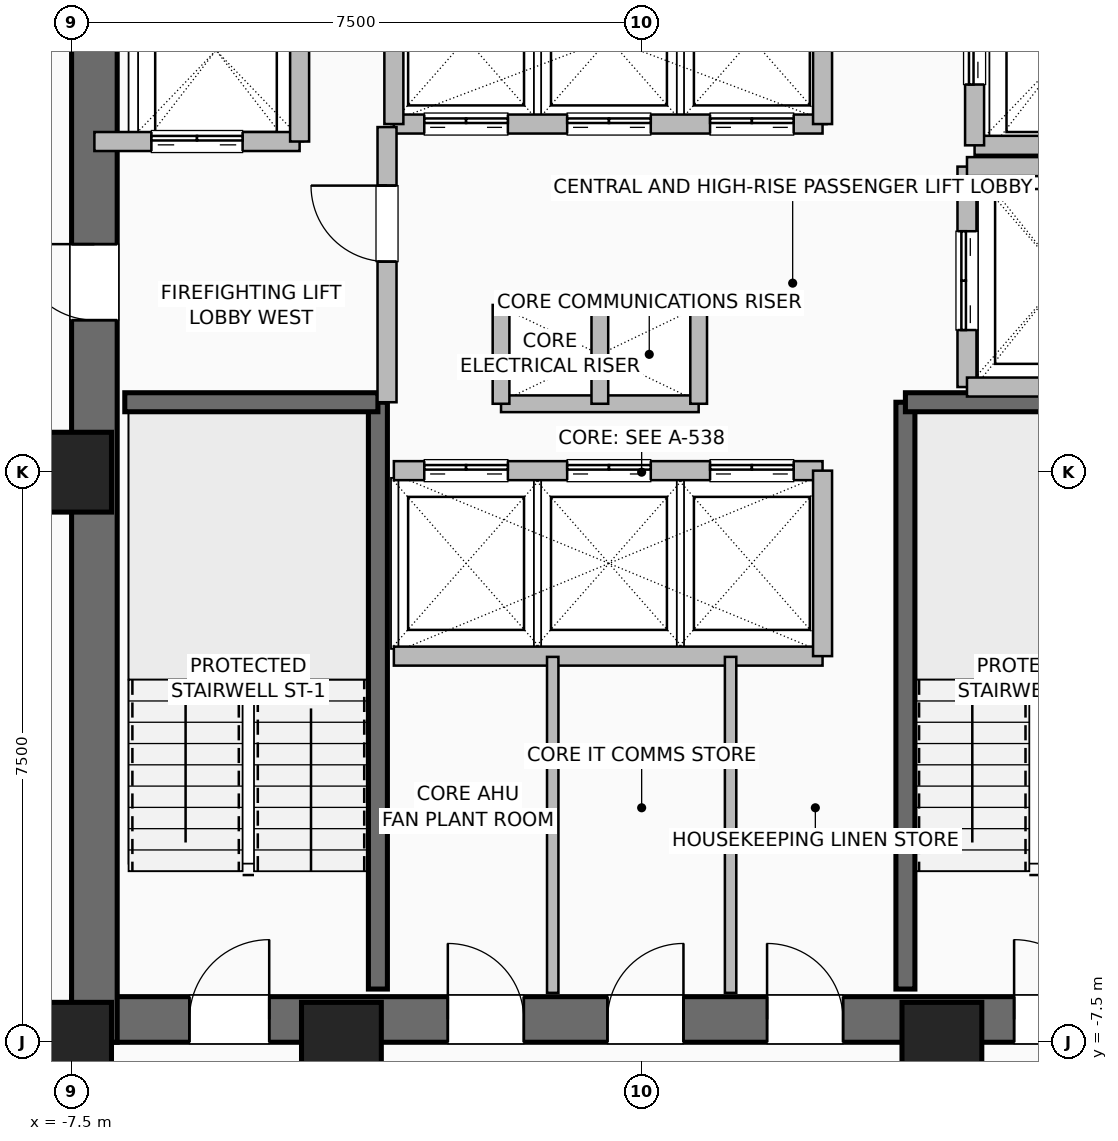
"""IFC4 building model, lengths in metres.
Left out: names, types, materials, properties, quantities, classifications, styles, units other than length and angle.
Written with IfcOpenShell. Run it as: python <this file> out.ifc"""

import sys

from ifc_helpers import new_model, si_unit, direction, frame, frame_2d, origin, origin_2d, place, context, subcontext, project, spatial, rectangle, hollow_rectangle, extrude, element, fill, save


model = new_model("IFC4")
c1 = context("Model", 3, precision=1e-05, world=origin(), true_north=direction((0.0, 1.0)))
c2 = subcontext(c1, "Body", "Model", "MODEL_VIEW")
j1 = project(units=[si_unit("LENGTHUNIT", "METRE"), si_unit("PLANEANGLEUNIT", "RADIAN")], contexts=[c1])
p1 = place(None, origin())
s1 = spatial("IfcSite", under=j1, at=p1, CompositionType="ELEMENT")
p2 = place(p1, origin())
s2 = spatial("IfcBuilding", under=s1, at=p2, CompositionType="ELEMENT")
p3 = place(p2, frame((0.0, 0.0, 144.4)))
s3 = spatial("IfcBuildingStorey", under=s2, at=p3, CompositionType="ELEMENT", Elevation=144.4)
for number, where, z_axis, x_axis in (
    (1, (-7.5, -7.5, 0.0), (0.0, 0.0, 1.0), (1.0, 0.0, 0.0)),
    (2, (-3.95, -7.5, 0.0), (0.0, 0.0, 1.0), (1.0, 0.0, 0.0)),
    (3, (3.95, -7.5, 0.0), (0.0, 0.0, 1.0), (1.0, 0.0, 0.0)),
    (4, (-7.5, 0.0, 0.0), (0.0, 0.0, 1.0), (1.0, 0.0, 0.0)),
):
    element("IfcColumn", number, at=place(p3, frame(where, z_axis=z_axis, x_axis=x_axis)), inside=s3, PredefinedType="COLUMN", context=c2, shape_type="SweptSolid", body=[
        extrude(hollow_rectangle(XDim=1.05, YDim=1.05, WallThickness=0.05, at=origin_2d()), origin(), (0.0, 0.0, 1.0), 3.6),
    ])
p4 = place(p3, frame((-7.5, -7.2, 0.0), z_axis=(0.0, 0.0, 1.0), x_axis=(1.0, 0.0, 0.0)))
e5 = element("IfcWall", 5, at=p4, inside=s3, PredefinedType="SHEAR", context=c2, shape_type="SweptSolid", body=[
    extrude(rectangle(XDim=15.0, YDim=0.6, at=frame_2d((7.5, 0.0))), origin(), (0.0, 0.0, 1.0), 3.36),
])
p5 = place(p4, frame((1.55, 0.0, 0.0)))
e6 = element("IfcOpeningElement", 6, at=p5, cuts=e5, PredefinedType="OPENING", context=c2, shape_type="SweptSolid", body=[
    extrude(rectangle(XDim=1.05, YDim=2.08, at=frame_2d((0.525, 1.04))), frame((0.0, 0.31, 0.0), z_axis=(0.0, -1.0, 0.0), x_axis=(1.0, 0.0, 0.0)), (0.0, 0.0, 1.0), 0.62),
])
p6 = place(p4, frame((12.4, 0.0, 0.0)))
e7 = element("IfcOpeningElement", 7, at=p6, cuts=e5, PredefinedType="OPENING", context=c2, shape_type="SweptSolid", body=[
    extrude(rectangle(XDim=1.05, YDim=2.08, at=frame_2d((0.525, 1.04))), frame((0.0, 0.31, 0.0), z_axis=(0.0, -1.0, 0.0), x_axis=(1.0, 0.0, 0.0)), (0.0, 0.0, 1.0), 0.62),
])
p7 = place(p4, frame((4.95, 0.0, 0.0)))
e8 = element("IfcOpeningElement", 8, at=p7, cuts=e5, PredefinedType="OPENING", context=c2, shape_type="SweptSolid", body=[
    extrude(rectangle(XDim=1.0, YDim=2.08, at=frame_2d((0.5, 1.04))), frame((0.0, 0.31, 0.0), z_axis=(0.0, -1.0, 0.0), x_axis=(1.0, 0.0, 0.0)), (0.0, 0.0, 1.0), 0.62),
])
p8 = place(p4, frame((7.05, 0.0, 0.0)))
e9 = element("IfcOpeningElement", 9, at=p8, cuts=e5, PredefinedType="OPENING", context=c2, shape_type="SweptSolid", body=[
    extrude(rectangle(XDim=1.0, YDim=2.08, at=frame_2d((0.5, 1.04))), frame((0.0, 0.31, 0.0), z_axis=(0.0, -1.0, 0.0), x_axis=(1.0, 0.0, 0.0)), (0.0, 0.0, 1.0), 0.62),
])
p9 = place(p4, frame((9.15, 0.0, 0.0)))
e10 = element("IfcOpeningElement", 10, at=p9, cuts=e5, PredefinedType="OPENING", context=c2, shape_type="SweptSolid", body=[
    extrude(rectangle(XDim=1.0, YDim=2.08, at=frame_2d((0.5, 1.04))), frame((0.0, 0.31, 0.0), z_axis=(0.0, -1.0, 0.0), x_axis=(1.0, 0.0, 0.0)), (0.0, 0.0, 1.0), 0.62),
])
p10 = place(p3, frame((-7.2, -7.5, 0.0), z_axis=(0.0, 0.0, 1.0), x_axis=(0.0, 1.0, 0.0)))
e11 = element("IfcWall", 11, at=p10, inside=s3, PredefinedType="SHEAR", context=c2, shape_type="SweptSolid", body=[
    extrude(rectangle(XDim=15.0, YDim=0.6, at=frame_2d((7.5, 0.0))), origin(), (0.0, 0.0, 1.0), 3.36),
])
p11 = place(p10, frame((9.5, 0.0, 0.0)))
e12 = element("IfcOpeningElement", 12, at=p11, cuts=e11, PredefinedType="OPENING", context=c2, shape_type="SweptSolid", body=[
    extrude(rectangle(XDim=1.0, YDim=2.08, at=frame_2d((0.5, 1.04))), frame((0.0, 0.31, 0.0), z_axis=(0.0, -1.0, 0.0), x_axis=(1.0, 0.0, 0.0)), (0.0, 0.0, 1.0), 0.62),
])
p12 = place(p3, frame((-3.47, -6.8, 0.0), z_axis=(0.0, 0.0, 1.0), x_axis=(0.0, 1.0, 0.0)))
e13 = element("IfcWall", 13, at=p12, inside=s3, PredefinedType="SHEAR", context=c2, shape_type="SweptSolid", body=[
    extrude(rectangle(XDim=7.72, YDim=0.25, at=frame_2d((3.86, 0.0))), origin(), (0.0, 0.0, 1.0), 3.36),
])
p13 = place(p3, frame((-6.8, 0.92, 0.0), z_axis=(0.0, 0.0, 1.0), x_axis=(1.0, 0.0, 0.0)))
e14 = element("IfcWall", 14, at=p13, inside=s3, PredefinedType="SHEAR", context=c2, shape_type="SweptSolid", body=[
    extrude(rectangle(XDim=3.33, YDim=0.25, at=frame_2d((1.665, 0.0))), origin(), (0.0, 0.0, 1.0), 3.36),
])
p14 = place(p3, frame((3.47, -6.8, 0.0), z_axis=(0.0, 0.0, 1.0), x_axis=(0.0, 1.0, 0.0)))
e15 = element("IfcWall", 15, at=p14, inside=s3, PredefinedType="SHEAR", context=c2, shape_type="SweptSolid", body=[
    extrude(rectangle(XDim=7.72, YDim=0.25, at=frame_2d((3.86, 0.0))), origin(), (0.0, 0.0, 1.0), 3.36),
])
p15 = place(p3, frame((3.47, 0.92, 0.0), z_axis=(0.0, 0.0, 1.0), x_axis=(1.0, 0.0, 0.0)))
e16 = element("IfcWall", 16, at=p15, inside=s3, PredefinedType="SHEAR", context=c2, shape_type="SweptSolid", body=[
    extrude(rectangle(XDim=3.33, YDim=0.25, at=frame_2d((1.665, 0.0))), origin(), (0.0, 0.0, 1.0), 3.36),
])
for number, where, z_axis, x_axis in (
    (17, (-1.85, 2.2, 0.0), (0.0, 0.0, 1.0), (1.0, 0.0, 0.0)),
    (18, (-1.85, 0.9, 0.0), (0.0, 0.0, 1.0), (1.0, 0.0, 0.0)),
):
    element("IfcWall", number, at=place(p3, frame(where, z_axis=z_axis, x_axis=x_axis)), inside=s3, PredefinedType="PARTITIONING", context=c2, shape_type="SweptSolid", body=[
        extrude(rectangle(XDim=2.6, YDim=0.22, at=frame_2d((1.3, 0.0))), origin(), (0.0, 0.0, 1.0), 3.36),
    ])
for number, where, z_axis, x_axis in (
    (19, (-0.55, 0.9, 0.0), (0.0, 0.0, 1.0), (0.0, 1.0, 0.0)),
    (20, (0.75, 0.9, 0.0), (0.0, 0.0, 1.0), (0.0, 1.0, 0.0)),
    (21, (-1.85, 0.9, 0.0), (0.0, 0.0, 1.0), (0.0, 1.0, 0.0)),
):
    element("IfcWall", number, at=place(p3, frame(where, z_axis=z_axis, x_axis=x_axis)), inside=s3, PredefinedType="PARTITIONING", context=c2, shape_type="SweptSolid", body=[
        extrude(rectangle(XDim=1.3, YDim=0.22, at=frame_2d((0.65, 0.0))), origin(), (0.0, 0.0, 1.0), 3.36),
    ])
p16 = place(p3, frame((-3.26, 0.02, 0.0), z_axis=(0.0, 0.0, 1.0), x_axis=(1.0, 0.0, 0.0)))
e22 = element("IfcWall", 22, at=p16, inside=s3, PredefinedType="SHEAR", context=c2, shape_type="SweptSolid", body=[
    extrude(rectangle(XDim=5.64, YDim=0.25, at=frame_2d((2.82, 0.0))), origin(), (0.0, 0.0, 1.0), 3.36),
])
p17 = place(p16, frame((0.4, 0.0, 0.0)))
e23 = element("IfcOpeningElement", 23, at=p17, cuts=e22, PredefinedType="OPENING", context=c2, shape_type="SweptSolid", body=[
    extrude(rectangle(XDim=1.1, YDim=2.2, at=frame_2d((0.55, 1.1))), frame((0.0, 0.135, 0.0), z_axis=(0.0, -1.0, 0.0), x_axis=(1.0, 0.0, 0.0)), (0.0, 0.0, 1.0), 0.27),
])
p18 = place(p16, frame((2.28, 0.0, 0.0)))
e24 = element("IfcOpeningElement", 24, at=p18, cuts=e22, PredefinedType="OPENING", context=c2, shape_type="SweptSolid", body=[
    extrude(rectangle(XDim=1.1, YDim=2.2, at=frame_2d((0.55, 1.1))), frame((0.0, 0.135, 0.0), z_axis=(0.0, -1.0, 0.0), x_axis=(1.0, 0.0, 0.0)), (0.0, 0.0, 1.0), 0.27),
])
p19 = place(p16, frame((4.16, 0.0, 0.0)))
e25 = element("IfcOpeningElement", 25, at=p19, cuts=e22, PredefinedType="OPENING", context=c2, shape_type="SweptSolid", body=[
    extrude(rectangle(XDim=1.1, YDim=2.2, at=frame_2d((0.55, 1.1))), frame((0.0, 0.135, 0.0), z_axis=(0.0, -1.0, 0.0), x_axis=(1.0, 0.0, 0.0)), (0.0, 0.0, 1.0), 0.27),
])
p20 = place(p3, frame((-3.26, -2.42, 0.0), z_axis=(0.0, 0.0, 1.0), x_axis=(1.0, 0.0, 0.0)))
e26 = element("IfcWall", 26, at=p20, inside=s3, PredefinedType="SHEAR", context=c2, shape_type="SweptSolid", body=[
    extrude(rectangle(XDim=5.64, YDim=0.25, at=frame_2d((2.82, 0.0))), origin(), (0.0, 0.0, 1.0), 3.36),
])
p21 = place(p3, frame((2.38, -2.42, 0.0), z_axis=(0.0, 0.0, 1.0), x_axis=(0.0, 1.0, 0.0)))
e27 = element("IfcWall", 27, at=p21, inside=s3, PredefinedType="SHEAR", context=c2, shape_type="SweptSolid", body=[
    extrude(rectangle(XDim=2.44, YDim=0.25, at=frame_2d((1.22, 0.0))), origin(), (0.0, 0.0, 1.0), 3.36),
])
p22 = place(p3, frame((-3.26, 4.58, 0.0), z_axis=(0.0, 0.0, 1.0), x_axis=(1.0, 0.0, 0.0)))
e28 = element("IfcWall", 28, at=p22, inside=s3, PredefinedType="SHEAR", context=c2, shape_type="SweptSolid", body=[
    extrude(rectangle(XDim=5.64, YDim=0.25, at=frame_2d((2.82, 0.0))), origin(), (0.0, 0.0, 1.0), 3.36),
])
p23 = place(p22, frame((0.4, 0.0, 0.0)))
e29 = element("IfcOpeningElement", 29, at=p23, cuts=e28, PredefinedType="OPENING", context=c2, shape_type="SweptSolid", body=[
    extrude(rectangle(XDim=1.1, YDim=2.2, at=frame_2d((0.55, 1.1))), frame((0.0, 0.135, 0.0), z_axis=(0.0, -1.0, 0.0), x_axis=(1.0, 0.0, 0.0)), (0.0, 0.0, 1.0), 0.27),
])
p24 = place(p22, frame((2.28, 0.0, 0.0)))
e30 = element("IfcOpeningElement", 30, at=p24, cuts=e28, PredefinedType="OPENING", context=c2, shape_type="SweptSolid", body=[
    extrude(rectangle(XDim=1.1, YDim=2.2, at=frame_2d((0.55, 1.1))), frame((0.0, 0.135, 0.0), z_axis=(0.0, -1.0, 0.0), x_axis=(1.0, 0.0, 0.0)), (0.0, 0.0, 1.0), 0.27),
])
p25 = place(p22, frame((4.16, 0.0, 0.0)))
e31 = element("IfcOpeningElement", 31, at=p25, cuts=e28, PredefinedType="OPENING", context=c2, shape_type="SweptSolid", body=[
    extrude(rectangle(XDim=1.1, YDim=2.2, at=frame_2d((0.55, 1.1))), frame((0.0, 0.135, 0.0), z_axis=(0.0, -1.0, 0.0), x_axis=(1.0, 0.0, 0.0)), (0.0, 0.0, 1.0), 0.27),
])
for number, where, z_axis, x_axis in (
    (32, (-3.26, 4.58, 0.0), (0.0, 0.0, 1.0), (0.0, 1.0, 0.0)),
    (33, (2.38, 4.58, 0.0), (0.0, 0.0, 1.0), (0.0, 1.0, 0.0)),
):
    element("IfcWall", number, at=place(p3, frame(where, z_axis=z_axis, x_axis=x_axis)), inside=s3, PredefinedType="SHEAR", context=c2, shape_type="SweptSolid", body=[
        extrude(rectangle(XDim=2.22, YDim=0.25, at=frame_2d((1.11, 0.0))), origin(), (0.0, 0.0, 1.0), 3.36),
    ])
p26 = place(p3, frame((-7.2, 4.35, 0.0), z_axis=(0.0, 0.0, 1.0), x_axis=(1.0, 0.0, 0.0)))
e34 = element("IfcWall", 34, at=p26, inside=s3, PredefinedType="SHEAR", context=c2, shape_type="SweptSolid", body=[
    extrude(rectangle(XDim=2.7, YDim=0.25, at=frame_2d((1.35, 0.0))), origin(), (0.0, 0.0, 1.0), 3.36),
])
p27 = place(p26, frame((0.75, 0.0, 0.0)))
e35 = element("IfcOpeningElement", 35, at=p27, cuts=e34, PredefinedType="OPENING", context=c2, shape_type="SweptSolid", body=[
    extrude(rectangle(XDim=1.2, YDim=2.2, at=frame_2d((0.6, 1.1))), frame((0.0, 0.135, 0.0), z_axis=(0.0, -1.0, 0.0), x_axis=(1.0, 0.0, 0.0)), (0.0, 0.0, 1.0), 0.27),
])
p28 = place(p3, frame((-4.5, 4.35, 0.0), z_axis=(0.0, 0.0, 1.0), x_axis=(0.0, 1.0, 0.0)))
e36 = element("IfcWall", 36, at=p28, inside=s3, PredefinedType="SHEAR", context=c2, shape_type="SweptSolid", body=[
    extrude(rectangle(XDim=2.85, YDim=0.25, at=frame_2d((1.425, 0.0))), origin(), (0.0, 0.0, 1.0), 3.36),
])
p29 = place(p3, frame((4.38, 4.3, 0.0), z_axis=(0.0, 0.0, 1.0), x_axis=(1.0, 0.0, 0.0)))
e37 = element("IfcWall", 37, at=p29, inside=s3, PredefinedType="SHEAR", context=c2, shape_type="SweptSolid", body=[
    extrude(rectangle(XDim=2.42, YDim=0.25, at=frame_2d((1.21, 0.0))), origin(), (0.0, 0.0, 1.0), 3.36),
])
p30 = place(p3, frame((4.38, 4.3, 0.0), z_axis=(0.0, 0.0, 1.0), x_axis=(0.0, 1.0, 0.0)))
e38 = element("IfcWall", 38, at=p30, inside=s3, PredefinedType="SHEAR", context=c2, shape_type="SweptSolid", body=[
    extrude(rectangle(XDim=2.5, YDim=0.25, at=frame_2d((1.25, 0.0))), origin(), (0.0, 0.0, 1.0), 3.36),
])
p31 = place(p30, frame((0.8, 0.0, 0.0)))
e39 = element("IfcOpeningElement", 39, at=p31, cuts=e38, PredefinedType="OPENING", context=c2, shape_type="SweptSolid", body=[
    extrude(rectangle(XDim=1.2, YDim=2.2, at=frame_2d((0.6, 1.1))), frame((0.0, 0.135, 0.0), z_axis=(0.0, -1.0, 0.0), x_axis=(1.0, 0.0, 0.0)), (0.0, 0.0, 1.0), 0.27),
])
p32 = place(p3, frame((4.28, 1.12, 0.0), z_axis=(0.0, 0.0, 1.0), x_axis=(0.0, 1.0, 0.0)))
e40 = element("IfcWall", 40, at=p32, inside=s3, PredefinedType="SHEAR", context=c2, shape_type="SweptSolid", body=[
    extrude(rectangle(XDim=2.9, YDim=0.25, at=frame_2d((1.45, 0.0))), origin(), (0.0, 0.0, 1.0), 3.36),
])
p33 = place(p32, frame((0.75, 0.0, 0.0)))
e41 = element("IfcOpeningElement", 41, at=p33, cuts=e40, PredefinedType="OPENING", context=c2, shape_type="SweptSolid", body=[
    extrude(rectangle(XDim=1.3, YDim=2.3, at=frame_2d((0.65, 1.15))), frame((0.0, 0.135, 0.0), z_axis=(0.0, -1.0, 0.0), x_axis=(1.0, 0.0, 0.0)), (0.0, 0.0, 1.0), 0.27),
])
for number, where, z_axis, x_axis in (
    (42, (4.28, 1.12, 0.0), (0.0, 0.0, 1.0), (1.0, 0.0, 0.0)),
    (43, (4.28, 4.02, 0.0), (0.0, 0.0, 1.0), (1.0, 0.0, 0.0)),
):
    element("IfcWall", number, at=place(p3, frame(where, z_axis=z_axis, x_axis=x_axis)), inside=s3, PredefinedType="SHEAR", context=c2, shape_type="SweptSolid", body=[
        extrude(rectangle(XDim=2.52, YDim=0.25, at=frame_2d((1.26, 0.0))), origin(), (0.0, 0.0, 1.0), 3.36),
    ])
p34 = place(p3, frame((-3.35, 0.92, 0.0), z_axis=(0.0, 0.0, 1.0), x_axis=(0.0, 1.0, 0.0)))
e44 = element("IfcWall", 44, at=p34, inside=s3, PredefinedType="SHEAR", context=c2, shape_type="SweptSolid", body=[
    extrude(rectangle(XDim=3.62, YDim=0.25, at=frame_2d((1.81, 0.0))), origin(), (0.0, 0.0, 1.0), 3.36),
])
p35 = place(p34, frame((1.85, 0.0, 0.0)))
e45 = element("IfcOpeningElement", 45, at=p35, cuts=e44, PredefinedType="OPENING", context=c2, shape_type="SweptSolid", body=[
    extrude(rectangle(XDim=1.0, YDim=2.08, at=frame_2d((0.5, 1.04))), frame((0.0, 0.135, 0.0), z_axis=(0.0, -1.0, 0.0), x_axis=(1.0, 0.0, 0.0)), (0.0, 0.0, 1.0), 0.27),
])
for number, where, z_axis, x_axis in (
    (46, (-1.17, -6.85, 0.0), (0.0, 0.0, 1.0), (0.0, 1.0, 0.0)),
    (47, (1.17, -6.85, 0.0), (0.0, 0.0, 1.0), (0.0, 1.0, 0.0)),
):
    element("IfcWall", number, at=place(p3, frame(where, z_axis=z_axis, x_axis=x_axis)), inside=s3, PredefinedType="PARTITIONING", context=c2, shape_type="SweptSolid", body=[
        extrude(rectangle(XDim=4.42, YDim=0.15, at=frame_2d((2.21, 0.0))), origin(), (0.0, 0.0, 1.0), 3.36),
    ])
p36 = place(p5, origin())
e48 = element("IfcDoor", 48, at=p36, inside=s3, OperationType="SINGLE_SWING_RIGHT", PredefinedType="DOOR", context=c2, shape_type="SweptSolid", body=[
    extrude(rectangle(XDim=1.05, YDim=2.08, at=frame_2d((0.525, 1.04))), frame((0.0, 0.025, 0.0), z_axis=(0.0, -1.0, 0.0), x_axis=(1.0, 0.0, 0.0)), (0.0, 0.0, 1.0), 0.05),
])
fill(e6, e48)
p37 = place(p6, origin())
e49 = element("IfcDoor", 49, at=p37, inside=s3, OperationType="SINGLE_SWING_LEFT", PredefinedType="DOOR", context=c2, shape_type="SweptSolid", body=[
    extrude(rectangle(XDim=1.05, YDim=2.08, at=frame_2d((0.525, 1.04))), frame((0.0, 0.025, 0.0), z_axis=(0.0, -1.0, 0.0), x_axis=(1.0, 0.0, 0.0)), (0.0, 0.0, 1.0), 0.05),
])
fill(e7, e49)
p38 = place(p11, origin())
e50 = element("IfcDoor", 50, at=p38, inside=s3, OperationType="SINGLE_SWING_RIGHT", PredefinedType="DOOR", context=c2, shape_type="SweptSolid", body=[
    extrude(rectangle(XDim=1.0, YDim=2.08, at=frame_2d((0.5, 1.04))), frame((0.0, 0.025, 0.0), z_axis=(0.0, -1.0, 0.0), x_axis=(1.0, 0.0, 0.0)), (0.0, 0.0, 1.0), 0.05),
])
fill(e12, e50)
p39 = place(p7, origin())
e51 = element("IfcDoor", 51, at=p39, inside=s3, OperationType="SINGLE_SWING_LEFT", PredefinedType="DOOR", context=c2, shape_type="SweptSolid", body=[
    extrude(rectangle(XDim=1.0, YDim=2.08, at=frame_2d((0.5, 1.04))), frame((0.0, 0.025, 0.0), z_axis=(0.0, -1.0, 0.0), x_axis=(1.0, 0.0, 0.0)), (0.0, 0.0, 1.0), 0.05),
])
fill(e8, e51)
p40 = place(p8, origin())
e52 = element("IfcDoor", 52, at=p40, inside=s3, OperationType="SINGLE_SWING_RIGHT", PredefinedType="DOOR", context=c2, shape_type="SweptSolid", body=[
    extrude(rectangle(XDim=1.0, YDim=2.08, at=frame_2d((0.5, 1.04))), frame((0.0, 0.025, 0.0), z_axis=(0.0, -1.0, 0.0), x_axis=(1.0, 0.0, 0.0)), (0.0, 0.0, 1.0), 0.05),
])
fill(e9, e52)
p41 = place(p9, origin())
e53 = element("IfcDoor", 53, at=p41, inside=s3, OperationType="SINGLE_SWING_LEFT", PredefinedType="DOOR", context=c2, shape_type="SweptSolid", body=[
    extrude(rectangle(XDim=1.0, YDim=2.08, at=frame_2d((0.5, 1.04))), frame((0.0, 0.025, 0.0), z_axis=(0.0, -1.0, 0.0), x_axis=(1.0, 0.0, 0.0)), (0.0, 0.0, 1.0), 0.05),
])
fill(e10, e53)
p42 = place(p17, origin())
e54 = element("IfcDoor", 54, at=p42, inside=s3, OperationType="DOUBLE_DOOR_SLIDING", PredefinedType="DOOR", context=c2, shape_type="SweptSolid", body=[
    extrude(rectangle(XDim=1.1, YDim=2.2, at=frame_2d((0.55, 1.1))), frame((0.0, 0.025, 0.0), z_axis=(0.0, -1.0, 0.0), x_axis=(1.0, 0.0, 0.0)), (0.0, 0.0, 1.0), 0.05),
])
fill(e23, e54)
p43 = place(p18, origin())
e55 = element("IfcDoor", 55, at=p43, inside=s3, OperationType="DOUBLE_DOOR_SLIDING", PredefinedType="DOOR", context=c2, shape_type="SweptSolid", body=[
    extrude(rectangle(XDim=1.1, YDim=2.2, at=frame_2d((0.55, 1.1))), frame((0.0, 0.025, 0.0), z_axis=(0.0, -1.0, 0.0), x_axis=(1.0, 0.0, 0.0)), (0.0, 0.0, 1.0), 0.05),
])
fill(e24, e55)
p44 = place(p19, origin())
e56 = element("IfcDoor", 56, at=p44, inside=s3, OperationType="DOUBLE_DOOR_SLIDING", PredefinedType="DOOR", context=c2, shape_type="SweptSolid", body=[
    extrude(rectangle(XDim=1.1, YDim=2.2, at=frame_2d((0.55, 1.1))), frame((0.0, 0.025, 0.0), z_axis=(0.0, -1.0, 0.0), x_axis=(1.0, 0.0, 0.0)), (0.0, 0.0, 1.0), 0.05),
])
fill(e25, e56)
p45 = place(p23, origin())
e57 = element("IfcDoor", 57, at=p45, inside=s3, OperationType="DOUBLE_DOOR_SLIDING", PredefinedType="DOOR", context=c2, shape_type="SweptSolid", body=[
    extrude(rectangle(XDim=1.1, YDim=2.2, at=frame_2d((0.55, 1.1))), frame((0.0, 0.025, 0.0), z_axis=(0.0, -1.0, 0.0), x_axis=(1.0, 0.0, 0.0)), (0.0, 0.0, 1.0), 0.05),
])
fill(e29, e57)
p46 = place(p24, origin())
e58 = element("IfcDoor", 58, at=p46, inside=s3, OperationType="DOUBLE_DOOR_SLIDING", PredefinedType="DOOR", context=c2, shape_type="SweptSolid", body=[
    extrude(rectangle(XDim=1.1, YDim=2.2, at=frame_2d((0.55, 1.1))), frame((0.0, 0.025, 0.0), z_axis=(0.0, -1.0, 0.0), x_axis=(1.0, 0.0, 0.0)), (0.0, 0.0, 1.0), 0.05),
])
fill(e30, e58)
p47 = place(p25, origin())
e59 = element("IfcDoor", 59, at=p47, inside=s3, OperationType="DOUBLE_DOOR_SLIDING", PredefinedType="DOOR", context=c2, shape_type="SweptSolid", body=[
    extrude(rectangle(XDim=1.1, YDim=2.2, at=frame_2d((0.55, 1.1))), frame((0.0, 0.025, 0.0), z_axis=(0.0, -1.0, 0.0), x_axis=(1.0, 0.0, 0.0)), (0.0, 0.0, 1.0), 0.05),
])
fill(e31, e59)
p48 = place(p27, origin())
e60 = element("IfcDoor", 60, at=p48, inside=s3, OperationType="DOUBLE_DOOR_SLIDING", PredefinedType="DOOR", context=c2, shape_type="SweptSolid", body=[
    extrude(rectangle(XDim=1.2, YDim=2.2, at=frame_2d((0.6, 1.1))), frame((0.0, 0.025, 0.0), z_axis=(0.0, -1.0, 0.0), x_axis=(1.0, 0.0, 0.0)), (0.0, 0.0, 1.0), 0.05),
])
fill(e35, e60)
p49 = place(p31, origin())
e61 = element("IfcDoor", 61, at=p49, inside=s3, OperationType="DOUBLE_DOOR_SLIDING", PredefinedType="DOOR", context=c2, shape_type="SweptSolid", body=[
    extrude(rectangle(XDim=1.2, YDim=2.2, at=frame_2d((0.6, 1.1))), frame((0.0, 0.025, 0.0), z_axis=(0.0, -1.0, 0.0), x_axis=(1.0, 0.0, 0.0)), (0.0, 0.0, 1.0), 0.05),
])
fill(e39, e61)
p50 = place(p33, origin())
e62 = element("IfcDoor", 62, at=p50, inside=s3, OperationType="DOUBLE_DOOR_SLIDING", PredefinedType="DOOR", context=c2, shape_type="SweptSolid", body=[
    extrude(rectangle(XDim=1.3, YDim=2.3, at=frame_2d((0.65, 1.15))), frame((0.0, 0.025, 0.0), z_axis=(0.0, -1.0, 0.0), x_axis=(1.0, 0.0, 0.0)), (0.0, 0.0, 1.0), 0.05),
])
fill(e41, e62)
p51 = place(p35, origin())
e63 = element("IfcDoor", 63, at=p51, inside=s3, OperationType="SINGLE_SWING_RIGHT", PredefinedType="DOOR", context=c2, shape_type="SweptSolid", body=[
    extrude(rectangle(XDim=1.0, YDim=2.08, at=frame_2d((0.5, 1.04))), frame((0.0, 0.025, 0.0), z_axis=(0.0, -1.0, 0.0), x_axis=(1.0, 0.0, 0.0)), (0.0, 0.0, 1.0), 0.05),
])
fill(e45, e63)
save(model, sys.argv[1])
